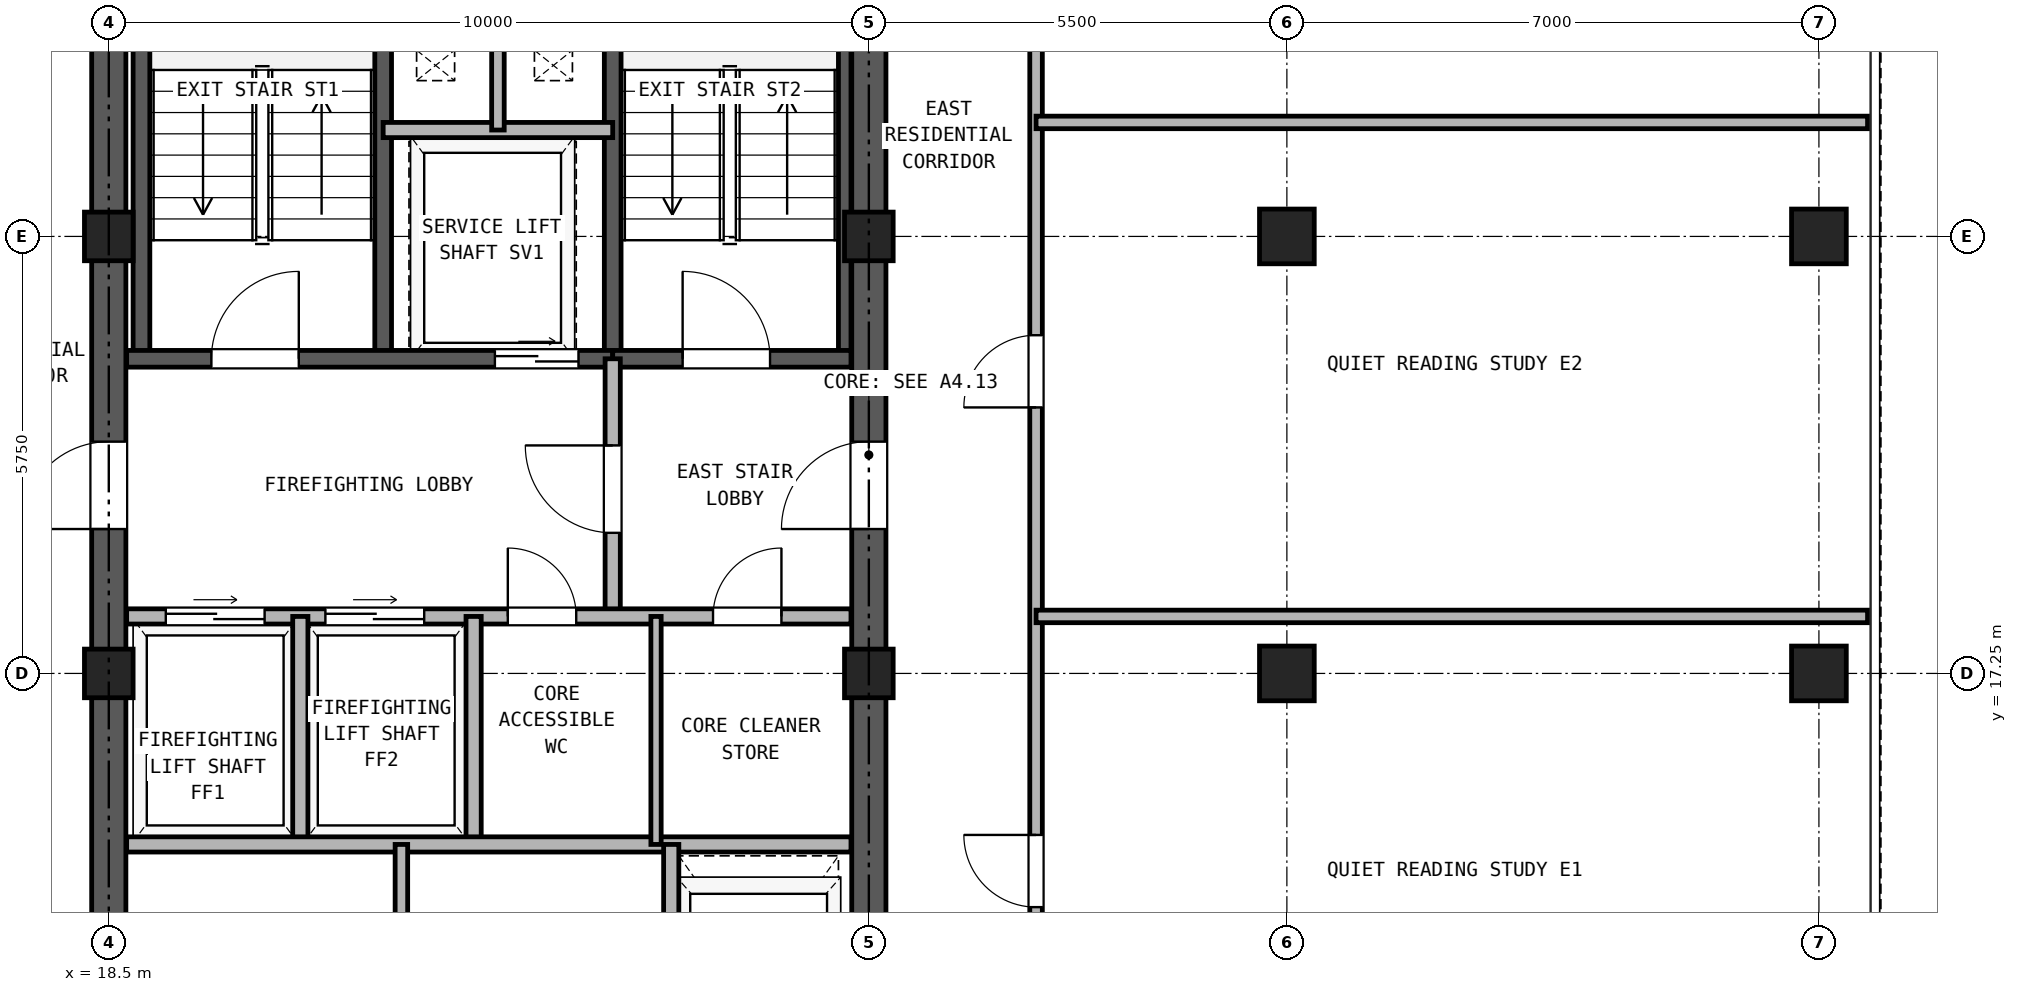
"""IFC4 building model, lengths in metres.
Left out: names, types, materials, properties, quantities, classifications, styles, units other than length and angle.
Written with IfcOpenShell. Run it as: python <this file> out.ifc"""

import sys

from ifc_helpers import new_model, si_unit, direction, frame, frame_2d, origin, origin_2d, place, context, subcontext, project, spatial, rectangle, hollow_rectangle, extrude, source, transform, mapped, element, fill, save


model = new_model("IFC4")
c1 = context("Model", 3, precision=1e-05, world=origin(), true_north=direction((0.0, 1.0)))
c2 = subcontext(c1, "Body", "Model", "MODEL_VIEW")
j1 = project(units=[si_unit("LENGTHUNIT", "METRE"), si_unit("PLANEANGLEUNIT", "RADIAN")], contexts=[c1])
p1 = place(None, origin())
s1 = spatial("IfcSite", under=j1, at=p1, CompositionType="ELEMENT")
p2 = place(p1, origin())
s2 = spatial("IfcBuilding", under=s1, at=p2, CompositionType="ELEMENT")
p3 = place(p2, frame((0.0, 0.0, 206.0)))
s3 = spatial("IfcBuildingStorey", under=s2, at=p3, CompositionType="ELEMENT", Elevation=206.0)
m1 = source(origin(), c2, "Body", "SweptSolid", [
    extrude(hollow_rectangle(XDim=0.72, YDim=0.72, WallThickness=0.04, at=origin_2d()), origin(), (0.0, 0.0, 1.0), 2.95),
])
for number, where, z_axis, x_axis in (
    (1, (41.0, 17.25, 0.0), (0.0, 0.0, 1.0), (1.0, 0.0, 0.0)),
    (2, (41.0, 23.0, 0.0), (0.0, 0.0, 1.0), (1.0, 0.0, 0.0)),
):
    element("IfcColumn", number, at=place(p3, frame(where, z_axis=z_axis, x_axis=x_axis)), inside=s3, PredefinedType="COLUMN", context=c2, shape_type="MappedRepresentation", body=[
        mapped(m1, transform((0.0, 0.0, 0.0), x_axis=(1.0, 0.0, 0.0), y_axis=(0.0, 1.0, 0.0), z_axis=(0.0, 0.0, 1.0), scale=1.0)),
    ])
m2 = source(origin(), c2, "Body", "SweptSolid", [
    extrude(hollow_rectangle(XDim=0.64, YDim=0.64, WallThickness=0.035, at=origin_2d()), origin(), (0.0, 0.0, 1.0), 2.95),
])
for number, where, z_axis, x_axis in (
    (3, (18.5, 17.25, 0.0), (0.0, 0.0, 1.0), (1.0, 0.0, 0.0)),
    (4, (18.5, 23.0, 0.0), (0.0, 0.0, 1.0), (1.0, 0.0, 0.0)),
    (5, (28.5, 17.25, 0.0), (0.0, 0.0, 1.0), (1.0, 0.0, 0.0)),
    (6, (28.5, 23.0, 0.0), (0.0, 0.0, 1.0), (1.0, 0.0, 0.0)),
):
    element("IfcColumn", number, at=place(p3, frame(where, z_axis=z_axis, x_axis=x_axis)), inside=s3, PredefinedType="COLUMN", context=c2, shape_type="MappedRepresentation", body=[
        mapped(m2, transform((0.0, 0.0, 0.0), x_axis=(1.0, 0.0, 0.0), y_axis=(0.0, 1.0, 0.0), z_axis=(0.0, 0.0, 1.0), scale=1.0)),
    ])
for number, where, z_axis, x_axis in (
    (7, (34.0, 17.25, 0.0), (0.0, 0.0, 1.0), (1.0, 0.0, 0.0)),
    (8, (34.0, 23.0, 0.0), (0.0, 0.0, 1.0), (1.0, 0.0, 0.0)),
):
    element("IfcColumn", number, at=place(p3, frame(where, z_axis=z_axis, x_axis=x_axis)), inside=s3, PredefinedType="COLUMN", context=c2, shape_type="MappedRepresentation", body=[
        mapped(m1, transform((0.0, 0.0, 0.0), x_axis=(1.0, 0.0, 0.0), y_axis=(0.0, 1.0, 0.0), z_axis=(0.0, 0.0, 1.0), scale=1.0)),
    ])
p4 = place(p3, frame((18.5, 11.725, 0.0), z_axis=(0.0, 0.0, 1.0), x_axis=(0.0, 1.0, 0.0)))
e9 = element("IfcWall", 9, at=p4, inside=s3, PredefinedType="SHEAR", context=c2, shape_type="SweptSolid", body=[
    extrude(rectangle(XDim=16.8, YDim=0.45, at=frame_2d((8.4, 0.0))), origin(), (0.0, 0.0, 1.0), 2.95),
])
p5 = place(p4, frame((7.425, 0.0, 0.0)))
e10 = element("IfcOpeningElement", 10, at=p5, cuts=e9, PredefinedType="OPENING", context=c2, shape_type="SweptSolid", body=[
    extrude(rectangle(XDim=1.15, YDim=2.2, at=frame_2d((0.575, 1.1))), frame((0.0, 0.235, 0.0), z_axis=(0.0, -1.0, 0.0), x_axis=(1.0, 0.0, 0.0)), (0.0, 0.0, 1.0), 0.47),
])
p6 = place(p3, frame((28.5, 11.725, 0.0), z_axis=(0.0, 0.0, 1.0), x_axis=(0.0, 1.0, 0.0)))
e11 = element("IfcWall", 11, at=p6, inside=s3, PredefinedType="SHEAR", context=c2, shape_type="SweptSolid", body=[
    extrude(rectangle(XDim=16.8, YDim=0.45, at=frame_2d((8.4, 0.0))), origin(), (0.0, 0.0, 1.0), 2.95),
])
p7 = place(p6, frame((7.425, 0.0, 0.0)))
e12 = element("IfcOpeningElement", 12, at=p7, cuts=e11, PredefinedType="OPENING", context=c2, shape_type="SweptSolid", body=[
    extrude(rectangle(XDim=1.15, YDim=2.2, at=frame_2d((0.575, 1.1))), frame((0.0, 0.235, 0.0), z_axis=(0.0, -1.0, 0.0), x_axis=(1.0, 0.0, 0.0)), (0.0, 0.0, 1.0), 0.47),
])
for number, where, z_axis, x_axis in (
    (13, (18.93, 21.39, 0.0), (0.0, 0.0, 1.0), (0.0, 1.0, 0.0)),
    (14, (22.11, 21.39, 0.0), (0.0, 0.0, 1.0), (0.0, 1.0, 0.0)),
    (15, (25.13, 21.39, 0.0), (0.0, 0.0, 1.0), (0.0, 1.0, 0.0)),
):
    element("IfcWall", number, at=place(p3, frame(where, z_axis=z_axis, x_axis=x_axis)), inside=s3, PredefinedType="SOLIDWALL", context=c2, shape_type="SweptSolid", body=[
        extrude(rectangle(XDim=7.11, YDim=0.22, at=frame_2d((3.555, 0.0))), origin(), (0.0, 0.0, 1.0), 2.95),
    ])
p8 = place(p3, frame((28.183, 21.39, 0.0), z_axis=(0.0, 0.0, 1.0), x_axis=(0.0, 1.0, 0.0)))
e16 = element("IfcWall", 16, at=p8, inside=s3, PredefinedType="PARTITIONING", context=c2, shape_type="SweptSolid", body=[
    extrude(rectangle(XDim=6.945, YDim=0.165, at=frame_2d((3.473, 0.0))), origin(), (0.0, 0.0, 1.0), 2.95),
])
p9 = place(p3, frame((18.735, 21.39, 0.0), z_axis=(0.0, 0.0, 1.0), x_axis=(1.0, 0.0, 0.0)))
e17 = element("IfcWall", 17, at=p9, inside=s3, PredefinedType="SOLIDWALL", context=c2, shape_type="SweptSolid", body=[
    extrude(rectangle(XDim=6.395, YDim=0.22, at=frame_2d((3.197, 0.0))), origin(), (0.0, 0.0, 1.0), 2.95),
])
p10 = place(p9, frame((1.115, 0.0, 0.0)))
e18 = element("IfcOpeningElement", 18, at=p10, cuts=e17, PredefinedType="OPENING", context=c2, shape_type="SweptSolid", body=[
    extrude(rectangle(XDim=1.15, YDim=2.2, at=frame_2d((0.575, 1.1))), frame((0.0, 0.12, 0.0), z_axis=(0.0, -1.0, 0.0), x_axis=(1.0, 0.0, 0.0)), (0.0, 0.0, 1.0), 0.24),
])
p11 = place(p9, frame((4.845, 0.0, 0.0)))
e19 = element("IfcOpeningElement", 19, at=p11, cuts=e17, PredefinedType="OPENING", context=c2, shape_type="SweptSolid", body=[
    extrude(rectangle(XDim=1.1, YDim=2.25, at=frame_2d((0.55, 1.125))), frame((0.0, 0.12, 0.0), z_axis=(0.0, -1.0, 0.0), x_axis=(1.0, 0.0, 0.0)), (0.0, 0.0, 1.0), 0.24),
])
p12 = place(p3, frame((25.13, 21.39, 0.0), z_axis=(0.0, 0.0, 1.0), x_axis=(1.0, 0.0, 0.0)))
e20 = element("IfcWall", 20, at=p12, inside=s3, PredefinedType="SOLIDWALL", context=c2, shape_type="SweptSolid", body=[
    extrude(rectangle(XDim=3.135, YDim=0.22, at=frame_2d((1.567, 0.0))), origin(), (0.0, 0.0, 1.0), 2.95),
])
p13 = place(p12, frame((0.92, 0.0, 0.0)))
e21 = element("IfcOpeningElement", 21, at=p13, cuts=e20, PredefinedType="OPENING", context=c2, shape_type="SweptSolid", body=[
    extrude(rectangle(XDim=1.15, YDim=2.2, at=frame_2d((0.575, 1.1))), frame((0.0, 0.12, 0.0), z_axis=(0.0, -1.0, 0.0), x_axis=(1.0, 0.0, 0.0)), (0.0, 0.0, 1.0), 0.24),
])
p14 = place(p3, frame((22.11, 24.4, 0.0), z_axis=(0.0, 0.0, 1.0), x_axis=(1.0, 0.0, 0.0)))
e22 = element("IfcWall", 22, at=p14, inside=s3, PredefinedType="PARTITIONING", context=c2, shape_type="SweptSolid", body=[
    extrude(rectangle(XDim=3.02, YDim=0.2, at=frame_2d((1.51, 0.0))), origin(), (0.0, 0.0, 1.0), 2.95),
])
p15 = place(p3, frame((23.62, 24.4, 0.0), z_axis=(0.0, 0.0, 1.0), x_axis=(0.0, 1.0, 0.0)))
e23 = element("IfcWall", 23, at=p15, inside=s3, PredefinedType="PARTITIONING", context=c2, shape_type="SweptSolid", body=[
    extrude(rectangle(XDim=4.115, YDim=0.165, at=frame_2d((2.058, 0.0))), origin(), (0.0, 0.0, 1.0), 2.95),
])
p16 = place(p3, frame((25.13, 18.0, 0.0), z_axis=(0.0, 0.0, 1.0), x_axis=(0.0, 1.0, 0.0)))
e24 = element("IfcWall", 24, at=p16, inside=s3, PredefinedType="PARTITIONING", context=c2, shape_type="SweptSolid", body=[
    extrude(rectangle(XDim=3.39, YDim=0.2, at=frame_2d((1.695, 0.0))), origin(), (0.0, 0.0, 1.0), 2.95),
])
p17 = place(p16, frame((1.1, 0.0, 0.0)))
e25 = element("IfcOpeningElement", 25, at=p17, cuts=e24, PredefinedType="OPENING", context=c2, shape_type="SweptSolid", body=[
    extrude(rectangle(XDim=1.15, YDim=2.2, at=frame_2d((0.575, 1.1))), frame((0.0, 0.11, 0.0), z_axis=(0.0, -1.0, 0.0), x_axis=(1.0, 0.0, 0.0)), (0.0, 0.0, 1.0), 0.22),
])
p18 = place(p3, frame((18.735, 18.0, 0.0), z_axis=(0.0, 0.0, 1.0), x_axis=(1.0, 0.0, 0.0)))
e26 = element("IfcWall", 26, at=p18, inside=s3, PredefinedType="PARTITIONING", context=c2, shape_type="SweptSolid", body=[
    extrude(rectangle(XDim=9.53, YDim=0.2, at=frame_2d((4.765, 0.0))), origin(), (0.0, 0.0, 1.0), 2.95),
])
p19 = place(p18, frame((0.515, 0.0, 0.0)))
e27 = element("IfcOpeningElement", 27, at=p19, cuts=e26, PredefinedType="OPENING", context=c2, shape_type="SweptSolid", body=[
    extrude(rectangle(XDim=1.3, YDim=2.3, at=frame_2d((0.65, 1.15))), frame((0.0, 0.11, 0.0), z_axis=(0.0, -1.0, 0.0), x_axis=(1.0, 0.0, 0.0)), (0.0, 0.0, 1.0), 0.22),
])
p20 = place(p18, frame((2.615, 0.0, 0.0)))
e28 = element("IfcOpeningElement", 28, at=p20, cuts=e26, PredefinedType="OPENING", context=c2, shape_type="SweptSolid", body=[
    extrude(rectangle(XDim=1.3, YDim=2.3, at=frame_2d((0.65, 1.15))), frame((0.0, 0.11, 0.0), z_axis=(0.0, -1.0, 0.0), x_axis=(1.0, 0.0, 0.0)), (0.0, 0.0, 1.0), 0.22),
])
p21 = place(p18, frame((5.015, 0.0, 0.0)))
e29 = element("IfcOpeningElement", 29, at=p21, cuts=e26, PredefinedType="OPENING", context=c2, shape_type="SweptSolid", body=[
    extrude(rectangle(XDim=0.9, YDim=2.05, at=frame_2d((0.45, 1.025))), frame((0.0, 0.11, 0.0), z_axis=(0.0, -1.0, 0.0), x_axis=(1.0, 0.0, 0.0)), (0.0, 0.0, 1.0), 0.22),
])
p22 = place(p18, frame((7.715, 0.0, 0.0)))
e30 = element("IfcOpeningElement", 30, at=p22, cuts=e26, PredefinedType="OPENING", context=c2, shape_type="SweptSolid", body=[
    extrude(rectangle(XDim=0.9, YDim=2.05, at=frame_2d((0.45, 1.025))), frame((0.0, 0.11, 0.0), z_axis=(0.0, -1.0, 0.0), x_axis=(1.0, 0.0, 0.0)), (0.0, 0.0, 1.0), 0.22),
])
for number, where, z_axis, x_axis in (
    (31, (21.02, 15.0, 0.0), (0.0, 0.0, 1.0), (0.0, 1.0, 0.0)),
    (32, (23.3, 15.0, 0.0), (0.0, 0.0, 1.0), (0.0, 1.0, 0.0)),
):
    element("IfcWall", number, at=place(p3, frame(where, z_axis=z_axis, x_axis=x_axis)), inside=s3, PredefinedType="PARTITIONING", context=c2, shape_type="SweptSolid", body=[
        extrude(rectangle(XDim=3.0, YDim=0.2, at=frame_2d((1.5, 0.0))), origin(), (0.0, 0.0, 1.0), 2.95),
    ])
p23 = place(p3, frame((18.735, 15.0, 0.0), z_axis=(0.0, 0.0, 1.0), x_axis=(1.0, 0.0, 0.0)))
e33 = element("IfcWall", 33, at=p23, inside=s3, PredefinedType="PARTITIONING", context=c2, shape_type="SweptSolid", body=[
    extrude(rectangle(XDim=9.53, YDim=0.2, at=frame_2d((4.765, 0.0))), origin(), (0.0, 0.0, 1.0), 2.95),
])
p24 = place(p3, frame((25.7, 15.0, 0.0), z_axis=(0.0, 0.0, 1.0), x_axis=(0.0, 1.0, 0.0)))
e34 = element("IfcWall", 34, at=p24, inside=s3, PredefinedType="PARTITIONING", context=c2, shape_type="SweptSolid", body=[
    extrude(rectangle(XDim=3.0, YDim=0.135, at=frame_2d((1.5, 0.0))), origin(), (0.0, 0.0, 1.0), 2.95),
])
p25 = place(p3, frame((22.35, 11.735, 0.0), z_axis=(0.0, 0.0, 1.0), x_axis=(0.0, 1.0, 0.0)))
e35 = element("IfcWall", 35, at=p25, inside=s3, PredefinedType="PARTITIONING", context=c2, shape_type="SweptSolid", body=[
    extrude(rectangle(XDim=3.265, YDim=0.165, at=frame_2d((1.632, 0.0))), origin(), (0.0, 0.0, 1.0), 2.95),
])
p26 = place(p3, frame((25.9, 11.735, 0.0), z_axis=(0.0, 0.0, 1.0), x_axis=(0.0, 1.0, 0.0)))
e36 = element("IfcWall", 36, at=p26, inside=s3, PredefinedType="PARTITIONING", context=c2, shape_type="SweptSolid", body=[
    extrude(rectangle(XDim=3.265, YDim=0.2, at=frame_2d((1.632, 0.0))), origin(), (0.0, 0.0, 1.0), 2.95),
])
p27 = place(p3, frame((30.7, 11.35, 0.0), z_axis=(0.0, 0.0, 1.0), x_axis=(0.0, 1.0, 0.0)))
e37 = element("IfcWall", 37, at=p27, inside=s3, PredefinedType="PARTITIONING", context=c2, shape_type="SweptSolid", body=[
    extrude(rectangle(XDim=23.79, YDim=0.165, at=frame_2d((11.895, 0.0))), origin(), (0.0, 0.0, 1.0), 2.95),
])
p28 = place(p27, frame((2.825, 0.0, 0.0)))
e38 = element("IfcOpeningElement", 38, at=p28, cuts=e37, PredefinedType="OPENING", context=c2, shape_type="SweptSolid", body=[
    extrude(rectangle(XDim=0.95, YDim=2.15, at=frame_2d((0.475, 1.075))), frame((0.0, 0.093, 0.0), z_axis=(0.0, -1.0, 0.0), x_axis=(1.0, 0.0, 0.0)), (0.0, 0.0, 1.0), 0.185),
])
p29 = place(p27, frame((9.4, 0.0, 0.0)))
e39 = element("IfcOpeningElement", 39, at=p29, cuts=e37, PredefinedType="OPENING", context=c2, shape_type="SweptSolid", body=[
    extrude(rectangle(XDim=0.95, YDim=2.15, at=frame_2d((0.475, 1.075))), frame((0.0, 0.093, 0.0), z_axis=(0.0, -1.0, 0.0), x_axis=(1.0, 0.0, 0.0)), (0.0, 0.0, 1.0), 0.185),
])
p30 = place(p27, frame((15.5, 0.0, 0.0)))
e40 = element("IfcOpeningElement", 40, at=p30, cuts=e37, PredefinedType="OPENING", context=c2, shape_type="SweptSolid", body=[
    extrude(rectangle(XDim=0.95, YDim=2.15, at=frame_2d((0.475, 1.075))), frame((0.0, 0.093, 0.0), z_axis=(0.0, -1.0, 0.0), x_axis=(1.0, 0.0, 0.0)), (0.0, 0.0, 1.0), 0.185),
])
p31 = place(p27, frame((20.82, 0.0, 0.0)))
e41 = element("IfcOpeningElement", 41, at=p31, cuts=e37, PredefinedType="OPENING", context=c2, shape_type="SweptSolid", body=[
    extrude(rectangle(XDim=0.95, YDim=2.15, at=frame_2d((0.475, 1.075))), frame((0.0, 0.093, 0.0), z_axis=(0.0, -1.0, 0.0), x_axis=(1.0, 0.0, 0.0)), (0.0, 0.0, 1.0), 0.185),
])
for number, where, z_axis, x_axis in (
    (42, (30.7, 18.0, 0.0), (0.0, 0.0, 1.0), (1.0, 0.0, 0.0)),
    (43, (30.7, 24.5, 0.0), (0.0, 0.0, 1.0), (1.0, 0.0, 0.0)),
):
    element("IfcWall", number, at=place(p3, frame(where, z_axis=z_axis, x_axis=x_axis)), inside=s3, PredefinedType="PARTITIONING", context=c2, shape_type="SweptSolid", body=[
        extrude(rectangle(XDim=10.94, YDim=0.165, at=frame_2d((5.47, 0.0))), origin(), (0.0, 0.0, 1.0), 2.95),
    ])
p32 = place(p10, frame((1.15, 0.0, 0.0), z_axis=(0.0, 0.0, 1.0), x_axis=(-1.0, 0.0, 0.0)))
e44 = element("IfcDoor", 44, at=p32, inside=s3, OperationType="SINGLE_SWING_RIGHT", PredefinedType="DOOR", context=c2, shape_type="SweptSolid", body=[
    extrude(rectangle(XDim=1.15, YDim=2.2, at=frame_2d((0.575, 1.1))), frame((0.0, 0.025, 0.0), z_axis=(0.0, -1.0, 0.0), x_axis=(1.0, 0.0, 0.0)), (0.0, 0.0, 1.0), 0.05),
])
fill(e18, e44)
p33 = place(p13, frame((1.15, 0.0, 0.0), z_axis=(0.0, 0.0, 1.0), x_axis=(-1.0, 0.0, 0.0)))
e45 = element("IfcDoor", 45, at=p33, inside=s3, OperationType="SINGLE_SWING_LEFT", PredefinedType="DOOR", context=c2, shape_type="SweptSolid", body=[
    extrude(rectangle(XDim=1.15, YDim=2.2, at=frame_2d((0.575, 1.1))), frame((0.0, 0.025, 0.0), z_axis=(0.0, -1.0, 0.0), x_axis=(1.0, 0.0, 0.0)), (0.0, 0.0, 1.0), 0.05),
])
fill(e21, e45)
p34 = place(p11, frame((1.1, 0.0, 0.0), z_axis=(0.0, 0.0, 1.0), x_axis=(-1.0, 0.0, 0.0)))
e46 = element("IfcDoor", 46, at=p34, inside=s3, OperationType="DOUBLE_DOOR_SLIDING", PredefinedType="DOOR", context=c2, shape_type="SweptSolid", body=[
    extrude(rectangle(XDim=1.1, YDim=2.25, at=frame_2d((0.55, 1.125))), frame((0.0, 0.025, 0.0), z_axis=(0.0, -1.0, 0.0), x_axis=(1.0, 0.0, 0.0)), (0.0, 0.0, 1.0), 0.05),
])
fill(e19, e46)
p35 = place(p17, origin())
e47 = element("IfcDoor", 47, at=p35, inside=s3, OperationType="SINGLE_SWING_RIGHT", PredefinedType="DOOR", context=c2, shape_type="SweptSolid", body=[
    extrude(rectangle(XDim=1.15, YDim=2.2, at=frame_2d((0.575, 1.1))), frame((0.0, 0.025, 0.0), z_axis=(0.0, -1.0, 0.0), x_axis=(1.0, 0.0, 0.0)), (0.0, 0.0, 1.0), 0.05),
])
fill(e25, e47)
p36 = place(p19, origin())
e48 = element("IfcDoor", 48, at=p36, inside=s3, OperationType="DOUBLE_DOOR_SLIDING", PredefinedType="DOOR", context=c2, shape_type="SweptSolid", body=[
    extrude(rectangle(XDim=1.3, YDim=2.3, at=frame_2d((0.65, 1.15))), frame((0.0, 0.025, 0.0), z_axis=(0.0, -1.0, 0.0), x_axis=(1.0, 0.0, 0.0)), (0.0, 0.0, 1.0), 0.05),
])
fill(e27, e48)
p37 = place(p20, origin())
e49 = element("IfcDoor", 49, at=p37, inside=s3, OperationType="DOUBLE_DOOR_SLIDING", PredefinedType="DOOR", context=c2, shape_type="SweptSolid", body=[
    extrude(rectangle(XDim=1.3, YDim=2.3, at=frame_2d((0.65, 1.15))), frame((0.0, 0.025, 0.0), z_axis=(0.0, -1.0, 0.0), x_axis=(1.0, 0.0, 0.0)), (0.0, 0.0, 1.0), 0.05),
])
fill(e28, e49)
p38 = place(p21, frame((0.9, 0.0, 0.0), z_axis=(0.0, 0.0, 1.0), x_axis=(-1.0, 0.0, 0.0)))
e50 = element("IfcDoor", 50, at=p38, inside=s3, OperationType="SINGLE_SWING_LEFT", PredefinedType="DOOR", context=c2, shape_type="SweptSolid", body=[
    extrude(rectangle(XDim=0.9, YDim=2.05, at=frame_2d((0.45, 1.025))), frame((0.0, 0.025, 0.0), z_axis=(0.0, -1.0, 0.0), x_axis=(1.0, 0.0, 0.0)), (0.0, 0.0, 1.0), 0.05),
])
fill(e29, e50)
p39 = place(p22, frame((0.9, 0.0, 0.0), z_axis=(0.0, 0.0, 1.0), x_axis=(-1.0, 0.0, 0.0)))
e51 = element("IfcDoor", 51, at=p39, inside=s3, OperationType="SINGLE_SWING_RIGHT", PredefinedType="DOOR", context=c2, shape_type="SweptSolid", body=[
    extrude(rectangle(XDim=0.9, YDim=2.05, at=frame_2d((0.45, 1.025))), frame((0.0, 0.025, 0.0), z_axis=(0.0, -1.0, 0.0), x_axis=(1.0, 0.0, 0.0)), (0.0, 0.0, 1.0), 0.05),
])
fill(e30, e51)
p40 = place(p5, frame((1.15, 0.0, 0.0), z_axis=(0.0, 0.0, 1.0), x_axis=(-1.0, 0.0, 0.0)))
e52 = element("IfcDoor", 52, at=p40, inside=s3, OperationType="SINGLE_SWING_LEFT", PredefinedType="DOOR", context=c2, shape_type="SweptSolid", body=[
    extrude(rectangle(XDim=1.15, YDim=2.2, at=frame_2d((0.575, 1.1))), frame((0.0, 0.025, 0.0), z_axis=(0.0, -1.0, 0.0), x_axis=(1.0, 0.0, 0.0)), (0.0, 0.0, 1.0), 0.05),
])
fill(e10, e52)
p41 = place(p7, origin())
e53 = element("IfcDoor", 53, at=p41, inside=s3, OperationType="SINGLE_SWING_LEFT", PredefinedType="DOOR", context=c2, shape_type="SweptSolid", body=[
    extrude(rectangle(XDim=1.15, YDim=2.2, at=frame_2d((0.575, 1.1))), frame((0.0, 0.025, 0.0), z_axis=(0.0, -1.0, 0.0), x_axis=(1.0, 0.0, 0.0)), (0.0, 0.0, 1.0), 0.05),
])
fill(e12, e53)
p42 = place(p28, origin())
e54 = element("IfcDoor", 54, at=p42, inside=s3, OperationType="SINGLE_SWING_RIGHT", PredefinedType="DOOR", context=c2, shape_type="SweptSolid", body=[
    extrude(rectangle(XDim=0.95, YDim=2.15, at=frame_2d((0.475, 1.075))), frame((0.0, 0.025, 0.0), z_axis=(0.0, -1.0, 0.0), x_axis=(1.0, 0.0, 0.0)), (0.0, 0.0, 1.0), 0.05),
])
fill(e38, e54)
p43 = place(p29, origin())
e55 = element("IfcDoor", 55, at=p43, inside=s3, OperationType="SINGLE_SWING_LEFT", PredefinedType="DOOR", context=c2, shape_type="SweptSolid", body=[
    extrude(rectangle(XDim=0.95, YDim=2.15, at=frame_2d((0.475, 1.075))), frame((0.0, 0.025, 0.0), z_axis=(0.0, -1.0, 0.0), x_axis=(1.0, 0.0, 0.0)), (0.0, 0.0, 1.0), 0.05),
])
fill(e39, e55)
save(model, sys.argv[1])
